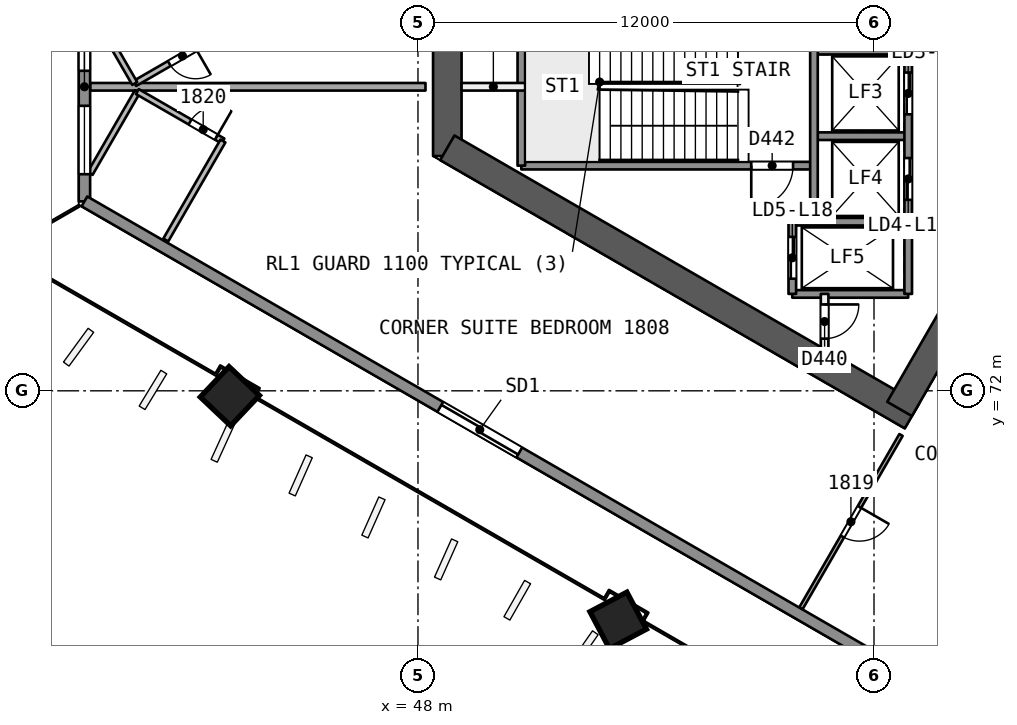
"""IFC4 building model, lengths in metres.
Left out: names, types, materials, properties, quantities, classifications, styles, units other than length and angle.
Written with IfcOpenShell. Run it as: python <this file> out.ifc"""

import sys

from ifc_helpers import new_model, si_unit, direction, frame, frame_2d, origin, origin_2d, place, context, subcontext, project, spatial, rectangle, extrude, element, fill, save


model = new_model("IFC4")
c1 = context("Model", 3, precision=1e-05, world=origin(), true_north=direction((0.0, 1.0)))
c2 = subcontext(c1, "Body", "Model", "MODEL_VIEW")
j1 = project(units=[si_unit("LENGTHUNIT", "METRE"), si_unit("PLANEANGLEUNIT", "RADIAN")], contexts=[c1])
p1 = place(None, origin())
s1 = spatial("IfcSite", under=j1, at=p1, CompositionType="ELEMENT")
p2 = place(p1, origin())
s2 = spatial("IfcBuilding", under=s1, at=p2, CompositionType="ELEMENT")
p3 = place(p2, frame((0.0, 0.0, 79.5)))
s3 = spatial("IfcBuildingStorey", under=s2, at=p3, CompositionType="ELEMENT", Elevation=79.5)
p4 = place(p3, frame((65.567, 80.0, 0.0), z_axis=(0.0, 0.0, 1.0), x_axis=(-0.499988615364, 0.866031976607, 0.0)))
e1 = element("IfcWall", 1, at=p4, inside=s3, PredefinedType="SHEAR", context=c2, shape_type="SweptSolid", body=[
    extrude(rectangle(XDim=10.163, YDim=0.75, at=frame_2d((5.082, 0.0))), origin(), (0.0, 0.0, 1.0), 3.7),
])
p5 = place(p4, frame((0.733, 0.0, 0.0)))
e2 = element("IfcOpeningElement", 2, at=p5, cuts=e1, PredefinedType="OPENING", context=c2, shape_type="SweptSolid", body=[
    extrude(rectangle(XDim=1.2, YDim=2.1, at=frame_2d((0.6, 1.05))), frame((0.0, 0.385, 0.0), z_axis=(0.0, -1.0, 0.0), x_axis=(1.0, 0.0, 0.0)), (0.0, 0.0, 1.0), 0.771),
])
p6 = place(p3, frame((48.772, 81.606, 0.0), z_axis=(0.0, 0.0, 1.0), x_axis=(0.0, -1.0, 0.0)))
e3 = element("IfcWall", 3, at=p6, inside=s3, PredefinedType="SHEAR", context=c2, shape_type="SweptSolid", body=[
    extrude(rectangle(XDim=3.429, YDim=0.75, at=frame_2d((1.714, 0.0))), origin(), (0.0, 0.0, 1.0), 3.7),
])
p7 = place(p3, frame((48.772, 78.394, 0.0), z_axis=(0.0, 0.0, 1.0), x_axis=(0.866028339916, -0.499994914436, 0.0)))
e4 = element("IfcWall", 4, at=p7, inside=s3, PredefinedType="SHEAR", context=c2, shape_type="SweptSolid", body=[
    extrude(rectangle(XDim=14.117, YDim=0.75, at=frame_2d((7.059, 0.0))), origin(), (0.0, 0.0, 1.0), 3.7),
])
p8 = place(p3, frame((60.673, 71.523, 0.0), z_axis=(0.0, 0.0, 1.0), x_axis=(0.499997052475, 0.866027105532, 0.0)))
e5 = element("IfcWall", 5, at=p8, inside=s3, PredefinedType="SHEAR", context=c2, shape_type="SweptSolid", body=[
    extrude(rectangle(XDim=10.005, YDim=0.75, at=frame_2d((5.002, 0.0))), origin(), (0.0, 0.0, 1.0), 3.7),
])
p9 = place(p8, frame((7.855, 0.0, 0.0)))
e6 = element("IfcOpeningElement", 6, at=p9, cuts=e5, PredefinedType="OPENING", context=c2, shape_type="SweptSolid", body=[
    extrude(rectangle(XDim=1.2, YDim=2.1, at=frame_2d((0.6, 1.05))), frame((0.0, 0.385, 0.0), z_axis=(0.0, -1.0, 0.0), x_axis=(1.0, 0.0, 0.0)), (0.0, 0.0, 1.0), 0.771),
])
p10 = place(p3, frame((43.015, 71.85, 0.0), z_axis=(0.028559101991, 0.006859460986, 0.999568569678), x_axis=(-0.866414848315, 0.498869008806, 0.021331260469)))
e7 = element("IfcColumn", 7, at=p10, inside=s3, PredefinedType="COLUMN", context=c2, shape_type="SweptSolid", body=[
    extrude(rectangle(XDim=1.1, YDim=1.1, at=origin_2d()), origin(), (0.0, 0.0, 1.0), 3.702),
])
p11 = place(p3, frame((53.245, 65.944, 0.0), z_axis=(0.019328516974, 0.012138044789, 0.999739504221), x_axis=(-0.865685889808, 0.500474070789, 0.010660424724)))
e8 = element("IfcColumn", 8, at=p11, inside=s3, PredefinedType="COLUMN", context=c2, shape_type="SweptSolid", body=[
    extrude(rectangle(XDim=1.1, YDim=1.1, at=origin_2d()), origin(), (0.0, 0.0, 1.0), 3.701),
])
p12 = place(p3, frame((42.798, 81.386, 0.0), z_axis=(0.0, 0.0, 1.0), x_axis=(-0.866021400173, -0.500006934395, 0.0)))
e9 = element("IfcWall", 9, at=p12, inside=s3, PredefinedType="PARTITIONING", context=c2, shape_type="SweptSolid", body=[
    extrude(rectangle(XDim=2.6, YDim=0.15, at=frame_2d((1.3, 0.0))), origin(), (0.0, 0.0, 1.0), 3.2),
])
p13 = place(p12, frame((0.75, 0.0, 0.0)))
e10 = element("IfcOpeningElement", 10, at=p13, cuts=e9, PredefinedType="OPENING", context=c2, shape_type="SweptSolid", body=[
    extrude(rectangle(XDim=0.8, YDim=2.1, at=frame_2d((0.4, 1.05))), frame((0.0, 0.085, 0.0), z_axis=(0.0, -1.0, 0.0), x_axis=(1.0, 0.0, 0.0)), (0.0, 0.0, 1.0), 0.171),
])
p14 = place(p3, frame((40.547, 80.086, 0.0), z_axis=(0.0, 0.0, 1.0), x_axis=(-0.499983284935, 0.866035054017, 0.0)))
e11 = element("IfcWall", 11, at=p14, inside=s3, PredefinedType="PARTITIONING", context=c2, shape_type="SweptSolid", body=[
    extrude(rectangle(XDim=2.35, YDim=0.15, at=frame_2d((1.175, 0.0))), origin(), (0.0, 0.0, 1.0), 3.2),
])
p15 = place(p3, frame((39.372, 80.0, 0.0), z_axis=(0.0, 0.0, 1.0), x_axis=(1.0, 0.0, 0.0)))
e12 = element("IfcWall", 12, at=p15, inside=s3, PredefinedType="PARTITIONING", context=c2, shape_type="SweptSolid", body=[
    extrude(rectangle(XDim=8.826, YDim=0.2, at=frame_2d((4.413, 0.0))), origin(), (0.0, 0.0, 1.0), 3.2),
])
p16 = place(p3, frame((60.71, 70.838, 0.0), z_axis=(0.0, 0.0, 1.0), x_axis=(-0.499973627007, -0.866040629704, 0.0)))
e13 = element("IfcWall", 13, at=p16, inside=s3, PredefinedType="PARTITIONING", context=c2, shape_type="SweptSolid", body=[
    extrude(rectangle(XDim=5.273, YDim=0.1, at=frame_2d((2.636, 0.0))), origin(), (0.0, 0.0, 1.0), 3.2),
])
p17 = place(p16, frame((2.186, 0.0, 0.0)))
e14 = element("IfcOpeningElement", 14, at=p17, cuts=e13, PredefinedType="OPENING", context=c2, shape_type="SweptSolid", body=[
    extrude(rectangle(XDim=0.9, YDim=2.1, at=frame_2d((0.45, 1.05))), frame((0.0, 0.061, 0.0), z_axis=(0.0, -1.0, 0.0), x_axis=(1.0, 0.0, 0.0)), (0.0, 0.0, 1.0), 0.121),
])
p18 = place(p3, frame((39.372, 77.718, 0.0), z_axis=(0.0, 0.0, 1.0), x_axis=(0.499968694491, 0.866043477274, 0.0)))
e15 = element("IfcWall", 15, at=p18, inside=s3, PredefinedType="PARTITIONING", context=c2, shape_type="SweptSolid", body=[
    extrude(rectangle(XDim=2.489, YDim=0.15, at=frame_2d((1.245, 0.0))), origin(), (0.0, 0.0, 1.0), 3.2),
])
p19 = place(p3, frame((40.616, 79.873, 0.0), z_axis=(0.0, 0.0, 1.0), x_axis=(0.866021400173, -0.500006934395, 0.0)))
e16 = element("IfcWall", 16, at=p19, inside=s3, PredefinedType="PARTITIONING", context=c2, shape_type="SweptSolid", body=[
    extrude(rectangle(XDim=2.6, YDim=0.15, at=frame_2d((1.3, 0.0))), origin(), (0.0, 0.0, 1.0), 3.2),
])
p20 = place(p19, frame((1.6, 0.0, 0.0)))
e17 = element("IfcOpeningElement", 17, at=p20, cuts=e16, PredefinedType="OPENING", context=c2, shape_type="SweptSolid", body=[
    extrude(rectangle(XDim=0.8, YDim=2.1, at=frame_2d((0.4, 1.05))), frame((0.0, 0.085, 0.0), z_axis=(0.0, -1.0, 0.0), x_axis=(1.0, 0.0, 0.0)), (0.0, 0.0, 1.0), 0.171),
])
p21 = place(p3, frame((42.868, 78.573, 0.0), z_axis=(0.0, 0.0, 1.0), x_axis=(-0.499961250474, -0.866047774678, 0.0)))
e18 = element("IfcWall", 18, at=p21, inside=s3, PredefinedType="PARTITIONING", context=c2, shape_type="SweptSolid", body=[
    extrude(rectangle(XDim=3.009, YDim=0.15, at=frame_2d((1.504, 0.0))), origin(), (0.0, 0.0, 1.0), 3.2),
])
p22 = place(p3, frame((39.223, 76.984, 0.0), z_axis=(0.0, 0.0, 1.0), x_axis=(0.0, 1.0, 0.0)))
e19 = element("IfcWall", 19, at=p22, inside=s3, PredefinedType="SOLIDWALL", context=c2, shape_type="SweptSolid", body=[
    extrude(rectangle(XDim=6.032, YDim=0.3, at=frame_2d((3.016, 0.0))), origin(), (0.0, 0.0, 1.0), 3.2),
])
p23 = place(p22, frame((3.437, 0.0, 0.9)))
e20 = element("IfcOpeningElement", 20, at=p23, cuts=e19, PredefinedType="OPENING", context=c2, shape_type="SweptSolid", body=[
    extrude(rectangle(XDim=1.8, YDim=1.5, at=frame_2d((0.9, 0.75))), frame((0.0, 0.161, 0.0), z_axis=(0.0, -1.0, 0.0), x_axis=(1.0, 0.0, 0.0)), (0.0, 0.0, 1.0), 0.321),
])
p24 = place(p22, frame((0.716, 0.0, 0.9)))
e21 = element("IfcOpeningElement", 21, at=p24, cuts=e19, PredefinedType="OPENING", context=c2, shape_type="SweptSolid", body=[
    extrude(rectangle(XDim=1.8, YDim=1.5, at=frame_2d((0.9, 0.75))), frame((0.0, 0.161, 0.0), z_axis=(0.0, -1.0, 0.0), x_axis=(1.0, 0.0, 0.0)), (0.0, 0.0, 1.0), 0.321),
])
p25 = place(p3, frame((90.276, 47.508, 0.0), z_axis=(0.0, 0.0, 1.0), x_axis=(-0.86602468924, 0.500001237625, 0.0)))
e22 = element("IfcWall", 22, at=p25, inside=s3, PredefinedType="SOLIDWALL", context=c2, shape_type="SweptSolid", body=[
    extrude(rectangle(XDim=58.951, YDim=0.3, at=frame_2d((29.476, 0.0))), origin(), (0.0, 0.0, 1.0), 3.2),
])
p26 = place(p25, frame((32.173, 0.0, 0.0)))
e23 = element("IfcOpeningElement", 23, at=p26, cuts=e22, PredefinedType="OPENING", context=c2, shape_type="SweptSolid", body=[
    extrude(rectangle(XDim=2.4, YDim=2.4, at=frame_2d((1.2, 1.2))), frame((0.0, 0.161, 0.0), z_axis=(0.0, -1.0, 0.0), x_axis=(1.0, 0.0, 0.0)), (0.0, 0.0, 1.0), 0.321),
])
p27 = place(p25, frame((45.739, 0.0, 0.0)))
e24 = element("IfcOpeningElement", 24, at=p27, cuts=e22, PredefinedType="OPENING", context=c2, shape_type="SweptSolid", body=[
    extrude(rectangle(XDim=2.4, YDim=2.4, at=frame_2d((1.2, 1.2))), frame((0.0, 0.161, 0.0), z_axis=(0.0, -1.0, 0.0), x_axis=(1.0, 0.0, 0.0)), (0.0, 0.0, 1.0), 0.321),
])
p28 = place(p25, frame((13.495, 0.0, 0.0)))
e25 = element("IfcOpeningElement", 25, at=p28, cuts=e22, PredefinedType="OPENING", context=c2, shape_type="SweptSolid", body=[
    extrude(rectangle(XDim=2.4, YDim=2.4, at=frame_2d((1.2, 1.2))), frame((0.0, 0.161, 0.0), z_axis=(0.0, -1.0, 0.0), x_axis=(1.0, 0.0, 0.0)), (0.0, 0.0, 1.0), 0.321),
])
p29 = place(p3, frame((60.9, 80.95, 0.0), z_axis=(0.0, 0.0, 1.0), x_axis=(-1.0, 0.0, 0.0)))
e26 = element("IfcWall", 26, at=p29, inside=s3, PredefinedType="SOLIDWALL", context=c2, shape_type="SweptSolid", body=[
    extrude(rectangle(XDim=2.48, YDim=0.2, at=frame_2d((1.24, 0.0))), origin(), (0.0, 0.0, 1.0), 3.2),
])
p30 = place(p3, frame((50.82, 80.0, 0.0), z_axis=(0.0, 0.0, 1.0), x_axis=(-1.0, 0.0, 0.0)))
e27 = element("IfcWall", 27, at=p30, inside=s3, PredefinedType="PARTITIONING", context=c2, shape_type="SweptSolid", body=[
    extrude(rectangle(XDim=1.673, YDim=0.2, at=frame_2d((0.836, 0.0))), origin(), (0.0, 0.0, 1.0), 3.2),
])
p31 = place(p3, frame((60.9, 78.7, 0.0), z_axis=(0.0, 0.0, 1.0), x_axis=(-1.0, 0.0, 0.0)))
e28 = element("IfcWall", 28, at=p31, inside=s3, PredefinedType="SOLIDWALL", context=c2, shape_type="SweptSolid", body=[
    extrude(rectangle(XDim=2.48, YDim=0.2, at=frame_2d((1.24, 0.0))), origin(), (0.0, 0.0, 1.0), 3.2),
])
p32 = place(p3, frame((58.42, 77.925, 0.0), z_axis=(0.0, 0.0, 1.0), x_axis=(-1.0, 0.0, 0.0)))
e29 = element("IfcWall", 29, at=p32, inside=s3, PredefinedType="SOLIDWALL", context=c2, shape_type="SweptSolid", body=[
    extrude(rectangle(XDim=7.7, YDim=0.2, at=frame_2d((3.85, 0.0))), origin(), (0.0, 0.0, 1.0), 3.2),
])
p33 = place(p32, frame((0.55, 0.0, 0.0)))
e30 = element("IfcOpeningElement", 30, at=p33, cuts=e29, PredefinedType="OPENING", context=c2, shape_type="SweptSolid", body=[
    extrude(rectangle(XDim=1.1, YDim=2.1, at=frame_2d((0.55, 1.05))), frame((0.0, 0.11, 0.0), z_axis=(0.0, -1.0, 0.0), x_axis=(1.0, 0.0, 0.0)), (0.0, 0.0, 1.0), 0.221),
])
for number, where, z_axis, x_axis in (
    (31, (60.9, 76.45, 0.0), (0.0, 0.0, 1.0), (-1.0, 0.0, 0.0)),
    (32, (60.9, 74.55, 0.0), (0.0, 0.0, 1.0), (-1.0, 0.0, 0.0)),
):
    element("IfcWall", number, at=place(p3, frame(where, z_axis=z_axis, x_axis=x_axis)), inside=s3, PredefinedType="SOLIDWALL", context=c2, shape_type="SweptSolid", body=[
        extrude(rectangle(XDim=3.05, YDim=0.2, at=frame_2d((1.525, 0.0))), origin(), (0.0, 0.0, 1.0), 3.2),
    ])
p34 = place(p3, frame((60.9, 85.45, 0.0), z_axis=(0.0, 0.0, 1.0), x_axis=(0.0, -1.0, 0.0)))
e33 = element("IfcWall", 33, at=p34, inside=s3, PredefinedType="SOLIDWALL", context=c2, shape_type="SweptSolid", body=[
    extrude(rectangle(XDim=10.9, YDim=0.2, at=frame_2d((5.45, 0.0))), origin(), (0.0, 0.0, 1.0), 3.2),
])
p35 = place(p34, frame((0.575, 0.0, 0.0)))
e34 = element("IfcOpeningElement", 34, at=p35, cuts=e33, PredefinedType="OPENING", context=c2, shape_type="SweptSolid", body=[
    extrude(rectangle(XDim=1.1, YDim=2.1, at=frame_2d((0.55, 1.05))), frame((0.0, 0.11, 0.0), z_axis=(0.0, -1.0, 0.0), x_axis=(1.0, 0.0, 0.0)), (0.0, 0.0, 1.0), 0.221),
])
p36 = place(p34, frame((2.825, 0.0, 0.0)))
e35 = element("IfcOpeningElement", 35, at=p36, cuts=e33, PredefinedType="OPENING", context=c2, shape_type="SweptSolid", body=[
    extrude(rectangle(XDim=1.1, YDim=2.1, at=frame_2d((0.55, 1.05))), frame((0.0, 0.11, 0.0), z_axis=(0.0, -1.0, 0.0), x_axis=(1.0, 0.0, 0.0)), (0.0, 0.0, 1.0), 0.221),
])
p37 = place(p34, frame((5.075, 0.0, 0.0)))
e36 = element("IfcOpeningElement", 36, at=p37, cuts=e33, PredefinedType="OPENING", context=c2, shape_type="SweptSolid", body=[
    extrude(rectangle(XDim=1.1, YDim=2.1, at=frame_2d((0.55, 1.05))), frame((0.0, 0.11, 0.0), z_axis=(0.0, -1.0, 0.0), x_axis=(1.0, 0.0, 0.0)), (0.0, 0.0, 1.0), 0.221),
])
p38 = place(p34, frame((7.325, 0.0, 0.0)))
e37 = element("IfcOpeningElement", 37, at=p38, cuts=e33, PredefinedType="OPENING", context=c2, shape_type="SweptSolid", body=[
    extrude(rectangle(XDim=1.1, YDim=2.1, at=frame_2d((0.55, 1.05))), frame((0.0, 0.11, 0.0), z_axis=(0.0, -1.0, 0.0), x_axis=(1.0, 0.0, 0.0)), (0.0, 0.0, 1.0), 0.221),
])
p39 = place(p3, frame((58.7, 74.55, 0.0), z_axis=(0.0, 0.0, 1.0), x_axis=(0.0, -1.0, 0.0)))
e38 = element("IfcWall", 38, at=p39, inside=s3, PredefinedType="PARTITIONING", context=c2, shape_type="SweptSolid", body=[
    extrude(rectangle(XDim=1.455, YDim=0.2, at=frame_2d((0.728, 0.0))), origin(), (0.0, 0.0, 1.0), 3.2),
])
p40 = place(p39, frame((0.278, 0.0, 0.0)))
e39 = element("IfcOpeningElement", 39, at=p40, cuts=e38, PredefinedType="OPENING", context=c2, shape_type="SweptSolid", body=[
    extrude(rectangle(XDim=0.9, YDim=2.1, at=frame_2d((0.45, 1.05))), frame((0.0, 0.11, 0.0), z_axis=(0.0, -1.0, 0.0), x_axis=(1.0, 0.0, 0.0)), (0.0, 0.0, 1.0), 0.221),
])
p41 = place(p3, frame((58.42, 85.45, 0.0), z_axis=(0.0, 0.0, 1.0), x_axis=(0.0, -1.0, 0.0)))
e40 = element("IfcWall", 40, at=p41, inside=s3, PredefinedType="SOLIDWALL", context=c2, shape_type="SweptSolid", body=[
    extrude(rectangle(XDim=9.0, YDim=0.2, at=frame_2d((4.5, 0.0))), origin(), (0.0, 0.0, 1.0), 3.2),
])
p42 = place(p3, frame((57.85, 76.45, 0.0), z_axis=(0.0, 0.0, 1.0), x_axis=(0.0, -1.0, 0.0)))
e41 = element("IfcWall", 41, at=p42, inside=s3, PredefinedType="SOLIDWALL", context=c2, shape_type="SweptSolid", body=[
    extrude(rectangle(XDim=1.9, YDim=0.2, at=frame_2d((0.95, 0.0))), origin(), (0.0, 0.0, 1.0), 3.2),
])
p43 = place(p42, frame((0.4, 0.0, 0.0)))
e42 = element("IfcOpeningElement", 42, at=p43, cuts=e41, PredefinedType="OPENING", context=c2, shape_type="SweptSolid", body=[
    extrude(rectangle(XDim=1.1, YDim=2.1, at=frame_2d((0.55, 1.05))), frame((0.0, 0.11, 0.0), z_axis=(0.0, -1.0, 0.0), x_axis=(1.0, 0.0, 0.0)), (0.0, 0.0, 1.0), 0.221),
])
p44 = place(p3, frame((50.72, 82.075, 0.0), z_axis=(0.0, 0.0, 1.0), x_axis=(0.0, -1.0, 0.0)))
e43 = element("IfcWall", 43, at=p44, inside=s3, PredefinedType="SOLIDWALL", context=c2, shape_type="SweptSolid", body=[
    extrude(rectangle(XDim=4.15, YDim=0.2, at=frame_2d((2.075, 0.0))), origin(), (0.0, 0.0, 1.0), 3.2),
])
p45 = place(p13, origin())
e44 = element("IfcDoor", 44, at=p45, inside=s3, OperationType="SINGLE_SWING_LEFT", PredefinedType="NOTDEFINED", context=c2, shape_type="SweptSolid", body=[
    extrude(rectangle(XDim=0.8, YDim=2.1, at=frame_2d((0.4, 1.05))), frame((0.0, 0.025, 0.0), z_axis=(0.0, -1.0, 0.0), x_axis=(1.0, 0.0, 0.0)), (0.0, 0.0, 1.0), 0.05),
])
fill(e10, e44)
p46 = place(p17, origin())
e45 = element("IfcDoor", 45, at=p46, inside=s3, OperationType="SINGLE_SWING_LEFT", PredefinedType="NOTDEFINED", context=c2, shape_type="SweptSolid", body=[
    extrude(rectangle(XDim=0.9, YDim=2.1, at=frame_2d((0.45, 1.05))), frame((0.0, 0.025, 0.0), z_axis=(0.0, -1.0, 0.0), x_axis=(1.0, 0.0, 0.0)), (0.0, 0.0, 1.0), 0.05),
])
fill(e14, e45)
p47 = place(p20, origin())
e46 = element("IfcDoor", 46, at=p47, inside=s3, OperationType="SINGLE_SWING_RIGHT", PredefinedType="NOTDEFINED", context=c2, shape_type="SweptSolid", body=[
    extrude(rectangle(XDim=0.8, YDim=2.1, at=frame_2d((0.4, 1.05))), frame((0.0, 0.025, 0.0), z_axis=(0.0, -1.0, 0.0), x_axis=(1.0, 0.0, 0.0)), (0.0, 0.0, 1.0), 0.05),
])
fill(e17, e46)
p48 = place(p23, origin())
e47 = element("IfcWindow", 47, at=p48, inside=s3, PartitioningType="SINGLE_PANEL", PredefinedType="WINDOW", context=c2, shape_type="SweptSolid", body=[
    extrude(rectangle(XDim=1.8, YDim=1.5, at=frame_2d((0.9, 0.75))), frame((0.0, 0.03, 0.0), z_axis=(0.0, -1.0, 0.0), x_axis=(1.0, 0.0, 0.0)), (0.0, 0.0, 1.0), 0.06),
])
fill(e20, e47)
p49 = place(p24, origin())
e48 = element("IfcWindow", 48, at=p49, inside=s3, PartitioningType="SINGLE_PANEL", PredefinedType="WINDOW", context=c2, shape_type="SweptSolid", body=[
    extrude(rectangle(XDim=1.8, YDim=1.5, at=frame_2d((0.9, 0.75))), frame((0.0, 0.03, 0.0), z_axis=(0.0, -1.0, 0.0), x_axis=(1.0, 0.0, 0.0)), (0.0, 0.0, 1.0), 0.06),
])
fill(e21, e48)
p50 = place(p27, origin())
e49 = element("IfcDoor", 49, at=p50, inside=s3, OperationType="SLIDING_TO_RIGHT", PredefinedType="NOTDEFINED", context=c2, shape_type="SweptSolid", body=[
    extrude(rectangle(XDim=2.4, YDim=2.4, at=frame_2d((1.2, 1.2))), frame((0.0, 0.025, 0.0), z_axis=(0.0, -1.0, 0.0), x_axis=(1.0, 0.0, 0.0)), (0.0, 0.0, 1.0), 0.05),
])
fill(e24, e49)
p51 = place(p37, origin())
e50 = element("IfcDoor", 50, at=p51, inside=s3, OperationType="SLIDING_TO_RIGHT", PredefinedType="NOTDEFINED", context=c2, shape_type="SweptSolid", body=[
    extrude(rectangle(XDim=1.1, YDim=2.1, at=frame_2d((0.55, 1.05))), frame((0.0, 0.025, 0.0), z_axis=(0.0, -1.0, 0.0), x_axis=(1.0, 0.0, 0.0)), (0.0, 0.0, 1.0), 0.05),
])
fill(e36, e50)
p52 = place(p38, origin())
e51 = element("IfcDoor", 51, at=p52, inside=s3, OperationType="SLIDING_TO_LEFT", PredefinedType="NOTDEFINED", context=c2, shape_type="SweptSolid", body=[
    extrude(rectangle(XDim=1.1, YDim=2.1, at=frame_2d((0.55, 1.05))), frame((0.0, 0.025, 0.0), z_axis=(0.0, -1.0, 0.0), x_axis=(1.0, 0.0, 0.0)), (0.0, 0.0, 1.0), 0.05),
])
fill(e37, e51)
p53 = place(p43, origin())
e52 = element("IfcDoor", 52, at=p53, inside=s3, OperationType="SLIDING_TO_RIGHT", PredefinedType="NOTDEFINED", context=c2, shape_type="SweptSolid", body=[
    extrude(rectangle(XDim=1.1, YDim=2.1, at=frame_2d((0.55, 1.05))), frame((0.0, 0.025, 0.0), z_axis=(0.0, -1.0, 0.0), x_axis=(1.0, 0.0, 0.0)), (0.0, 0.0, 1.0), 0.05),
])
fill(e42, e52)
p54 = place(p40, origin())
e53 = element("IfcDoor", 53, at=p54, inside=s3, OperationType="SINGLE_SWING_LEFT", PredefinedType="NOTDEFINED", context=c2, shape_type="SweptSolid", body=[
    extrude(rectangle(XDim=0.9, YDim=2.1, at=frame_2d((0.45, 1.05))), frame((0.0, 0.025, 0.0), z_axis=(0.0, -1.0, 0.0), x_axis=(1.0, 0.0, 0.0)), (0.0, 0.0, 1.0), 0.05),
])
fill(e39, e53)
p55 = place(p33, origin())
e54 = element("IfcDoor", 54, at=p55, inside=s3, OperationType="SINGLE_SWING_RIGHT", PredefinedType="NOTDEFINED", context=c2, shape_type="SweptSolid", body=[
    extrude(rectangle(XDim=1.1, YDim=2.1, at=frame_2d((0.55, 1.05))), frame((0.0, 0.025, 0.0), z_axis=(0.0, -1.0, 0.0), x_axis=(1.0, 0.0, 0.0)), (0.0, 0.0, 1.0), 0.05),
])
fill(e30, e54)
save(model, sys.argv[1])
